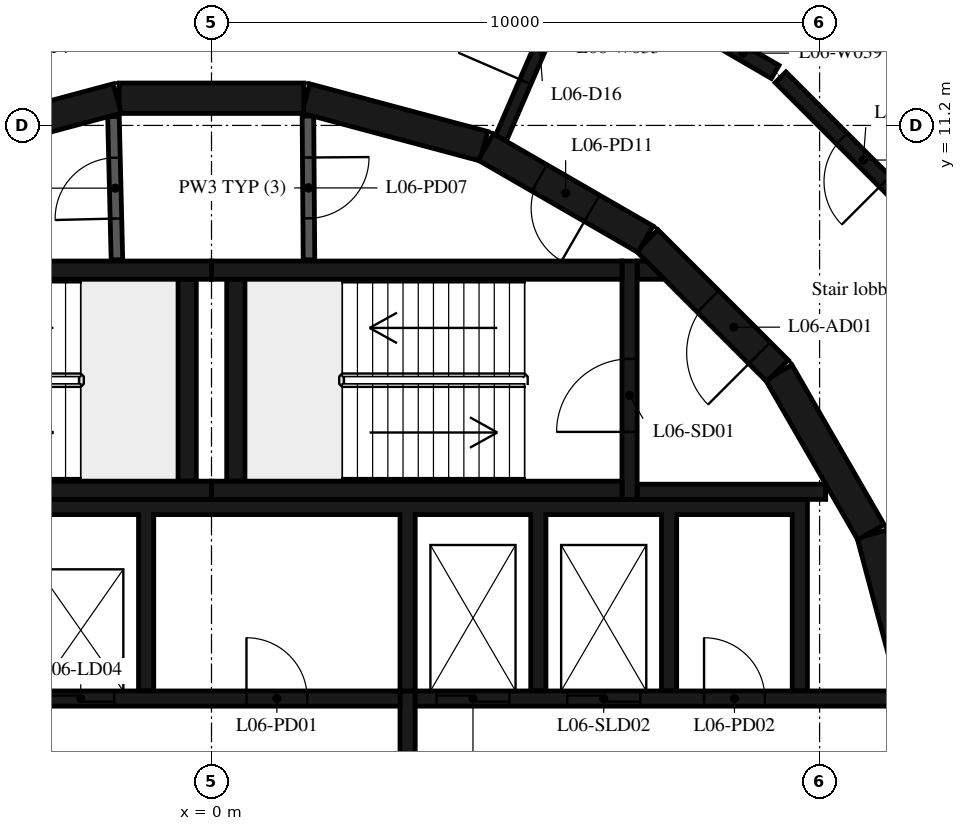
"""IFC4 building model, lengths in metres.
Left out: names, types, materials, properties, quantities, classifications, styles, units other than length and angle.
Written with IfcOpenShell. Run it as: python <this file> out.ifc"""

import sys

from ifc_helpers import new_model, si_unit, direction, frame, frame_2d, origin, place, context, subcontext, project, spatial, polyline, rectangle, outline, extrude, element, fill, save


model = new_model("IFC4")
c1 = context("Model", 3, precision=1e-05, world=origin(), true_north=direction((0.0, 1.0)))
c2 = subcontext(c1, "Body", "Model", "MODEL_VIEW")
j1 = project(units=[si_unit("LENGTHUNIT", "METRE"), si_unit("PLANEANGLEUNIT", "RADIAN")], contexts=[c1])
p1 = place(None, origin())
s1 = spatial("IfcSite", under=j1, at=p1, CompositionType="ELEMENT")
p2 = place(p1, origin())
s2 = spatial("IfcBuilding", under=s1, at=p2, CompositionType="ELEMENT")
p3 = place(p2, frame((0.0, 0.0, 33.0)))
s3 = spatial("IfcBuildingStorey", under=s2, at=p3, CompositionType="ELEMENT", Elevation=33.0)
for number, where, z_axis, x_axis in (
    (1, (11.643, 1.55, 0.0), (0.0, 0.0, 1.0), (-0.259, 0.966, 0.0)),
    (2, (10.845, 4.51, 0.0), (0.0, 0.0, 1.0), (-0.5, 0.866, 0.0)),
):
    element("IfcWall", number, at=place(p3, frame(where, z_axis=z_axis, x_axis=x_axis)), inside=s3, PredefinedType="SHEAR", context=c2, shape_type="SweptSolid", body=[
        extrude(rectangle(XDim=3.033, YDim=0.5, at=frame_2d((1.516, 0.0))), origin(), (0.0, 0.0, 1.0), 4.95),
    ])
p4 = place(p3, frame((9.308, 7.164, 0.0), z_axis=(0.0, 0.0, 1.0), x_axis=(-0.707106781187, 0.707106781187, 0.0)))
e3 = element("IfcWall", 3, at=p4, inside=s3, PredefinedType="SHEAR", context=c2, shape_type="SweptSolid", body=[
    extrude(rectangle(XDim=3.032, YDim=0.5, at=frame_2d((1.516, 0.0))), origin(), (0.0, 0.0, 1.0), 4.95),
])
p5 = place(p4, frame((0.416, 0.0, 0.0)))
e4 = element("IfcOpeningElement", 4, at=p5, cuts=e3, PredefinedType="OPENING", context=c2, shape_type="SweptSolid", body=[
    extrude(rectangle(XDim=1.2, YDim=2.1, at=frame_2d((0.6, 1.05))), frame((0.0, 0.26, 0.0), z_axis=(0.0, -1.0, 0.0), x_axis=(1.0, 0.0, 0.0)), (0.0, 0.0, 1.0), 0.52),
])
p6 = place(p3, frame((7.137, 9.329, 0.0), z_axis=(0.0, 0.0, 1.0), x_axis=(-0.865975092491, 0.500087131594, 0.0)))
e5 = element("IfcWall", 5, at=p6, inside=s3, PredefinedType="SHEAR", context=c2, shape_type="SweptSolid", body=[
    extrude(rectangle(XDim=3.033, YDim=0.5, at=frame_2d((1.516, 0.0))), origin(), (0.0, 0.0, 1.0), 4.95),
])
p7 = place(p6, frame((1.016, 0.0, 0.0)))
e6 = element("IfcOpeningElement", 6, at=p7, cuts=e5, PredefinedType="OPENING", context=c2, shape_type="SweptSolid", body=[
    extrude(rectangle(XDim=1.0, YDim=2.4, at=frame_2d((0.5, 1.2))), frame((0.0, 0.26, 0.0), z_axis=(0.0, -1.0, 0.0), x_axis=(1.0, 0.0, 0.0)), (0.0, 0.0, 1.0), 0.52),
])
for number, where, z_axis, x_axis in (
    (7, (4.479, 10.858, 0.0), (0.0, 0.0, 1.0), (-0.966, 0.259, 0.0)),
    (8, (1.516, 11.647, 0.0), (0.0, 0.0, 1.0), (-1.0, 0.0, 0.0)),
    (9, (-1.55, 11.643, 0.0), (0.0, 0.0, 1.0), (-0.966, -0.259, 0.0)),
):
    element("IfcWall", number, at=place(p3, frame(where, z_axis=z_axis, x_axis=x_axis)), inside=s3, PredefinedType="SHEAR", context=c2, shape_type="SweptSolid", body=[
        extrude(rectangle(XDim=3.033, YDim=0.5, at=frame_2d((1.516, 0.0))), origin(), (0.0, 0.0, 1.0), 4.95),
    ])
for number, where, z_axis, x_axis in (
    (10, (0.0, 5.2, 0.0), (0.0, 0.0, 1.0), (1.0, 0.0, 0.0)),
    (11, (0.0, 8.82, 0.0), (0.0, 0.0, 1.0), (1.0, 0.0, 0.0)),
):
    element("IfcWall", number, at=place(p3, frame(where, z_axis=z_axis, x_axis=x_axis)), inside=s3, PredefinedType="SHEAR", context=c2, shape_type="SweptSolid", body=[
        extrude(rectangle(XDim=6.75, YDim=0.3, at=frame_2d((3.375, 0.0))), origin(), (0.0, 0.0, 1.0), 4.95),
    ])
p8 = place(p3, frame((0.4, 5.35, 0.0), z_axis=(0.0, 0.0, 1.0), x_axis=(0.0, 1.0, 0.0)))
e12 = element("IfcWall", 12, at=p8, inside=s3, PredefinedType="SHEAR", context=c2, shape_type="SweptSolid", body=[
    extrude(rectangle(XDim=3.32, YDim=0.3, at=frame_2d((1.66, 0.0))), origin(), (0.0, 0.0, 1.0), 4.95),
])
p9 = place(p3, frame((6.875, 5.05, 0.0), z_axis=(0.0, 0.0, 1.0), x_axis=(0.0, 1.0, 0.0)))
e13 = element("IfcWall", 13, at=p9, inside=s3, PredefinedType="SHEAR", context=c2, shape_type="SweptSolid", body=[
    extrude(rectangle(XDim=3.92, YDim=0.25, at=frame_2d((1.96, 0.0))), origin(), (0.0, 0.0, 1.0), 4.95),
])
p10 = place(p9, frame((1.11, 0.0, 0.0)))
e14 = element("IfcOpeningElement", 14, at=p10, cuts=e13, PredefinedType="OPENING", context=c2, shape_type="SweptSolid", body=[
    extrude(rectangle(XDim=1.2, YDim=2.1, at=frame_2d((0.6, 1.05))), frame((0.0, 0.135, 0.0), z_axis=(0.0, -1.0, 0.0), x_axis=(1.0, 0.0, 0.0)), (0.0, 0.0, 1.0), 0.27),
])
p11 = place(p3, frame((7.0, 5.175, 0.0), z_axis=(0.0, 0.0, 1.0), x_axis=(1.0, 0.0, 0.0)))
e15 = element("IfcWall", 15, at=p11, inside=s3, PredefinedType="SHEAR", context=c2, shape_type="SweptSolid", body=[
    extrude(rectangle(XDim=3.1, YDim=0.25, at=frame_2d((1.55, 0.0))), origin(), (0.0, 0.0, 1.0), 4.95),
])
p12 = place(p3, origin())
e16 = element("IfcWall", 16, at=p12, inside=s3, PredefinedType="SHEAR", context=c2, shape_type="SweptSolid", body=[
    extrude(outline(polyline([(7.448, 8.67), (7.0, 8.67), (7.0, 8.97), (7.148, 8.97), (7.448, 8.67)])), origin(), (0.0, 0.0, 1.0), 4.95),
])
for number, where, z_axis, x_axis in (
    (17, (-6.75, 5.2, 0.0), (0.0, 0.0, 1.0), (1.0, 0.0, 0.0)),
    (18, (-6.75, 8.82, 0.0), (0.0, 0.0, 1.0), (1.0, 0.0, 0.0)),
):
    element("IfcWall", number, at=place(p3, frame(where, z_axis=z_axis, x_axis=x_axis)), inside=s3, PredefinedType="SHEAR", context=c2, shape_type="SweptSolid", body=[
        extrude(rectangle(XDim=6.75, YDim=0.3, at=frame_2d((3.375, 0.0))), origin(), (0.0, 0.0, 1.0), 4.95),
    ])
p13 = place(p3, frame((-0.4, 5.35, 0.0), z_axis=(0.0, 0.0, 1.0), x_axis=(0.0, 1.0, 0.0)))
e19 = element("IfcWall", 19, at=p13, inside=s3, PredefinedType="SHEAR", context=c2, shape_type="SweptSolid", body=[
    extrude(rectangle(XDim=3.32, YDim=0.3, at=frame_2d((1.66, 0.0))), origin(), (0.0, 0.0, 1.0), 4.95),
])
p14 = place(p3, origin())
e20 = element("IfcWall", 20, at=p14, inside=s3, PredefinedType="SHEAR", context=c2, shape_type="SweptSolid", body=[
    extrude(outline(polyline([(-9.55, 4.8), (-7.65, 4.8), (-7.65, 1.9), (-7.4, 1.9), (-7.4, 4.8), (-5.5, 4.8), (-5.5, 1.9), (-5.25, 1.9), (-5.25, 4.8), (-3.35, 4.8), (-3.35, 1.9), (-3.1, 1.9), (-3.1, 4.8), (-1.2, 4.8), (-1.2, 1.9), (-0.95, 1.9), (-0.95, 4.8), (3.1, 4.8), (3.1, 1.9), (3.35, 1.9), (3.35, 4.8), (5.25, 4.8), (5.25, 1.9), (5.5, 1.9), (5.5, 4.8), (7.4, 4.8), (7.4, 1.9), (7.65, 1.9), (7.65, 4.8), (9.55, 4.8), (9.55, 1.9), (9.8, 1.9), (9.8, 4.8), (9.8, 5.05), (-9.8, 5.05), (-9.8, 4.8), (-9.8, 1.9), (-9.55, 1.9), (-9.55, 4.8)])), origin(), (0.0, 0.0, 1.0), 4.95),
])
p15 = place(p3, frame((-11.28, 1.775, 0.0), z_axis=(0.0, 0.0, 1.0), x_axis=(1.0, 0.0, 0.0)))
e21 = element("IfcWall", 21, at=p15, inside=s3, PredefinedType="SHEAR", context=c2, shape_type="SweptSolid", body=[
    extrude(rectangle(XDim=14.38, YDim=0.25, at=frame_2d((7.19, 0.0))), origin(), (0.0, 0.0, 1.0), 4.95),
])
p16 = place(p15, frame((2.13, 0.0, 0.0)))
e22 = element("IfcOpeningElement", 22, at=p16, cuts=e21, PredefinedType="OPENING", context=c2, shape_type="SweptSolid", body=[
    extrude(rectangle(XDim=1.1, YDim=2.1, at=frame_2d((0.55, 1.05))), frame((0.0, 0.135, 0.0), z_axis=(0.0, -1.0, 0.0), x_axis=(1.0, 0.0, 0.0)), (0.0, 0.0, 1.0), 0.27),
])
p17 = place(p15, frame((4.28, 0.0, 0.0)))
e23 = element("IfcOpeningElement", 23, at=p17, cuts=e21, PredefinedType="OPENING", context=c2, shape_type="SweptSolid", body=[
    extrude(rectangle(XDim=1.1, YDim=2.1, at=frame_2d((0.55, 1.05))), frame((0.0, 0.135, 0.0), z_axis=(0.0, -1.0, 0.0), x_axis=(1.0, 0.0, 0.0)), (0.0, 0.0, 1.0), 0.27),
])
p18 = place(p15, frame((6.43, 0.0, 0.0)))
e24 = element("IfcOpeningElement", 24, at=p18, cuts=e21, PredefinedType="OPENING", context=c2, shape_type="SweptSolid", body=[
    extrude(rectangle(XDim=1.1, YDim=2.1, at=frame_2d((0.55, 1.05))), frame((0.0, 0.135, 0.0), z_axis=(0.0, -1.0, 0.0), x_axis=(1.0, 0.0, 0.0)), (0.0, 0.0, 1.0), 0.27),
])
p19 = place(p15, frame((8.58, 0.0, 0.0)))
e25 = element("IfcOpeningElement", 25, at=p19, cuts=e21, PredefinedType="OPENING", context=c2, shape_type="SweptSolid", body=[
    extrude(rectangle(XDim=1.1, YDim=2.1, at=frame_2d((0.55, 1.05))), frame((0.0, 0.135, 0.0), z_axis=(0.0, -1.0, 0.0), x_axis=(1.0, 0.0, 0.0)), (0.0, 0.0, 1.0), 0.27),
])
p20 = place(p15, frame((11.855, 0.0, 0.0)))
e26 = element("IfcOpeningElement", 26, at=p20, cuts=e21, PredefinedType="OPENING", context=c2, shape_type="SweptSolid", body=[
    extrude(rectangle(XDim=1.0, YDim=2.4, at=frame_2d((0.5, 1.2))), frame((0.0, 0.135, 0.0), z_axis=(0.0, -1.0, 0.0), x_axis=(1.0, 0.0, 0.0)), (0.0, 0.0, 1.0), 0.27),
])
p21 = place(p3, frame((3.35, 1.775, 0.0), z_axis=(0.0, 0.0, 1.0), x_axis=(1.0, 0.0, 0.0)))
e27 = element("IfcWall", 27, at=p21, inside=s3, PredefinedType="SHEAR", context=c2, shape_type="SweptSolid", body=[
    extrude(rectangle(XDim=7.93, YDim=0.25, at=frame_2d((3.965, 0.0))), origin(), (0.0, 0.0, 1.0), 4.95),
])
p22 = place(p21, frame((0.35, 0.0, 0.0)))
e28 = element("IfcOpeningElement", 28, at=p22, cuts=e27, PredefinedType="OPENING", context=c2, shape_type="SweptSolid", body=[
    extrude(rectangle(XDim=1.2, YDim=2.4, at=frame_2d((0.6, 1.2))), frame((0.0, 0.135, 0.0), z_axis=(0.0, -1.0, 0.0), x_axis=(1.0, 0.0, 0.0)), (0.0, 0.0, 1.0), 0.27),
])
p23 = place(p21, frame((2.5, 0.0, 0.0)))
e29 = element("IfcOpeningElement", 29, at=p23, cuts=e27, PredefinedType="OPENING", context=c2, shape_type="SweptSolid", body=[
    extrude(rectangle(XDim=1.2, YDim=2.4, at=frame_2d((0.6, 1.2))), frame((0.0, 0.135, 0.0), z_axis=(0.0, -1.0, 0.0), x_axis=(1.0, 0.0, 0.0)), (0.0, 0.0, 1.0), 0.27),
])
p24 = place(p21, frame((4.75, 0.0, 0.0)))
e30 = element("IfcOpeningElement", 30, at=p24, cuts=e27, PredefinedType="OPENING", context=c2, shape_type="SweptSolid", body=[
    extrude(rectangle(XDim=1.0, YDim=2.4, at=frame_2d((0.5, 1.2))), frame((0.0, 0.135, 0.0), z_axis=(0.0, -1.0, 0.0), x_axis=(1.0, 0.0, 0.0)), (0.0, 0.0, 1.0), 0.27),
])
p25 = place(p3, frame((3.225, -1.9, 0.0), z_axis=(0.0, 0.0, 1.0), x_axis=(0.0, 1.0, 0.0)))
e31 = element("IfcWall", 31, at=p25, inside=s3, PredefinedType="SHEAR", context=c2, shape_type="SweptSolid", body=[
    extrude(rectangle(XDim=3.8, YDim=0.25, at=frame_2d((1.9, 0.0))), origin(), (0.0, 0.0, 1.0), 4.95),
])
p26 = place(p3, frame((1.586, 11.354, 0.0), z_axis=(0.0, 0.0, 1.0), x_axis=(0.007227482881, -0.999973881405, 0.0)))
e32 = element("IfcWall", 32, at=p26, inside=s3, PredefinedType="PARTITIONING", context=c2, shape_type="SweptSolid", body=[
    extrude(rectangle(XDim=2.365, YDim=0.19, at=frame_2d((1.182, 0.0))), origin(), (0.0, 0.0, 1.0), 4.95),
])
p27 = place(p26, frame((0.682, 0.0, 0.0)))
e33 = element("IfcOpeningElement", 33, at=p27, cuts=e32, PredefinedType="OPENING", context=c2, shape_type="SweptSolid", body=[
    extrude(rectangle(XDim=1.0, YDim=2.4, at=frame_2d((0.5, 1.2))), frame((0.0, 0.105, 0.0), z_axis=(0.0, -1.0, 0.0), x_axis=(1.0, 0.0, 0.0)), (0.0, 0.0, 1.0), 0.21),
])
p28 = place(p3, frame((-1.555, 8.99, 0.0), z_axis=(0.0, 0.0, 1.0), x_axis=(-0.024125549686, 0.999708936567, 0.0)))
e34 = element("IfcWall", 34, at=p28, inside=s3, PredefinedType="PARTITIONING", context=c2, shape_type="SweptSolid", body=[
    extrude(rectangle(XDim=2.358, YDim=0.19, at=frame_2d((1.179, 0.0))), origin(), (0.0, 0.0, 1.0), 4.95),
])
p29 = place(p28, frame((0.679, 0.0, 0.0)))
e35 = element("IfcOpeningElement", 35, at=p29, cuts=e34, PredefinedType="OPENING", context=c2, shape_type="SweptSolid", body=[
    extrude(rectangle(XDim=1.0, YDim=2.4, at=frame_2d((0.5, 1.2))), frame((0.0, 0.105, 0.0), z_axis=(0.0, -1.0, 0.0), x_axis=(1.0, 0.0, 0.0)), (0.0, 0.0, 1.0), 0.21),
])
p30 = place(p3, frame((4.76, 10.99, 0.0), z_axis=(0.0, 0.0, 1.0), x_axis=(0.396905977672, 0.917859272922, 0.0)))
e36 = element("IfcWall", 36, at=p30, inside=s3, PredefinedType="PARTITIONING", context=c2, shape_type="SweptSolid", body=[
    extrude(rectangle(XDim=3.224, YDim=0.2, at=frame_2d((1.612, 0.0))), origin(), (0.0, 0.0, 1.0), 4.95),
])
p31 = place(p30, frame((1.012, 0.0, 0.0)))
e37 = element("IfcOpeningElement", 37, at=p31, cuts=e36, PredefinedType="OPENING", context=c2, shape_type="SweptSolid", body=[
    extrude(rectangle(XDim=1.2, YDim=2.1, at=frame_2d((0.6, 1.05))), frame((0.0, 0.11, 0.0), z_axis=(0.0, -1.0, 0.0), x_axis=(1.0, 0.0, 0.0)), (0.0, 0.0, 1.0), 0.22),
])
p32 = place(p3, frame((9.27, 12.08, 0.0), z_axis=(0.0, 0.0, 1.0), x_axis=(-0.864599561852, 0.502461538474, 0.0)))
e38 = element("IfcWall", 38, at=p32, inside=s3, PredefinedType="PARTITIONING", context=c2, shape_type="SweptSolid", body=[
    extrude(rectangle(XDim=1.228, YDim=0.25, at=frame_2d((0.614, 0.0))), origin(), (0.0, 0.0, 1.0), 4.95),
])
p33 = place(p3, frame((12.08, 9.27, 0.0), z_axis=(0.0, 0.0, 1.0), x_axis=(-0.707106781187, 0.707106781187, 0.0)))
e39 = element("IfcWall", 39, at=p33, inside=s3, PredefinedType="PARTITIONING", context=c2, shape_type="SweptSolid", body=[
    extrude(rectangle(XDim=3.849, YDim=0.25, at=frame_2d((1.925, 0.0))), origin(), (0.0, 0.0, 1.0), 4.95),
])
p34 = place(p33, frame((1.425, 0.0, 0.0)))
e40 = element("IfcOpeningElement", 40, at=p34, cuts=e39, PredefinedType="OPENING", context=c2, shape_type="SweptSolid", body=[
    extrude(rectangle(XDim=1.0, YDim=2.1, at=frame_2d((0.5, 1.05))), frame((0.0, 0.135, 0.0), z_axis=(0.0, -1.0, 0.0), x_axis=(1.0, 0.0, 0.0)), (0.0, 0.0, 1.0), 0.27),
])
p35 = place(p10, origin())
e41 = element("IfcDoor", 41, at=p35, inside=s3, OperationType="SINGLE_SWING_LEFT", PredefinedType="DOOR", context=c2, shape_type="SweptSolid", body=[
    extrude(rectangle(XDim=1.2, YDim=2.1, at=frame_2d((0.6, 1.05))), frame((0.0, 0.025, 0.0), z_axis=(0.0, -1.0, 0.0), x_axis=(1.0, 0.0, 0.0)), (0.0, 0.0, 1.0), 0.05),
])
fill(e14, e41)
p36 = place(p5, origin())
e42 = element("IfcDoor", 42, at=p36, inside=s3, OperationType="SINGLE_SWING_RIGHT", PredefinedType="DOOR", context=c2, shape_type="SweptSolid", body=[
    extrude(rectangle(XDim=1.2, YDim=2.1, at=frame_2d((0.6, 1.05))), frame((0.0, 0.025, 0.0), z_axis=(0.0, -1.0, 0.0), x_axis=(1.0, 0.0, 0.0)), (0.0, 0.0, 1.0), 0.05),
])
fill(e4, e42)
p37 = place(p19, origin())
e43 = element("IfcDoor", 43, at=p37, inside=s3, OperationType="DOUBLE_DOOR_SLIDING", PredefinedType="DOOR", context=c2, shape_type="SweptSolid", body=[
    extrude(rectangle(XDim=1.1, YDim=2.1, at=frame_2d((0.55, 1.05))), frame((0.0, 0.025, 0.0), z_axis=(0.0, -1.0, 0.0), x_axis=(1.0, 0.0, 0.0)), (0.0, 0.0, 1.0), 0.05),
])
fill(e25, e43)
p38 = place(p22, origin())
e44 = element("IfcDoor", 44, at=p38, inside=s3, OperationType="DOUBLE_DOOR_SLIDING", PredefinedType="DOOR", context=c2, shape_type="SweptSolid", body=[
    extrude(rectangle(XDim=1.2, YDim=2.4, at=frame_2d((0.6, 1.2))), frame((0.0, 0.025, 0.0), z_axis=(0.0, -1.0, 0.0), x_axis=(1.0, 0.0, 0.0)), (0.0, 0.0, 1.0), 0.05),
])
fill(e28, e44)
p39 = place(p23, origin())
e45 = element("IfcDoor", 45, at=p39, inside=s3, OperationType="DOUBLE_DOOR_SLIDING", PredefinedType="DOOR", context=c2, shape_type="SweptSolid", body=[
    extrude(rectangle(XDim=1.2, YDim=2.4, at=frame_2d((0.6, 1.2))), frame((0.0, 0.025, 0.0), z_axis=(0.0, -1.0, 0.0), x_axis=(1.0, 0.0, 0.0)), (0.0, 0.0, 1.0), 0.05),
])
fill(e29, e45)
p40 = place(p20, origin())
e46 = element("IfcDoor", 46, at=p40, inside=s3, OperationType="SINGLE_SWING_RIGHT", PredefinedType="DOOR", context=c2, shape_type="SweptSolid", body=[
    extrude(rectangle(XDim=1.0, YDim=2.4, at=frame_2d((0.5, 1.2))), frame((0.0, 0.025, 0.0), z_axis=(0.0, -1.0, 0.0), x_axis=(1.0, 0.0, 0.0)), (0.0, 0.0, 1.0), 0.05),
])
fill(e26, e46)
p41 = place(p24, origin())
e47 = element("IfcDoor", 47, at=p41, inside=s3, OperationType="SINGLE_SWING_LEFT", PredefinedType="DOOR", context=c2, shape_type="SweptSolid", body=[
    extrude(rectangle(XDim=1.0, YDim=2.4, at=frame_2d((0.5, 1.2))), frame((0.0, 0.025, 0.0), z_axis=(0.0, -1.0, 0.0), x_axis=(1.0, 0.0, 0.0)), (0.0, 0.0, 1.0), 0.05),
])
fill(e30, e47)
p42 = place(p27, origin())
e48 = element("IfcDoor", 48, at=p42, inside=s3, OperationType="SINGLE_SWING_RIGHT", PredefinedType="DOOR", context=c2, shape_type="SweptSolid", body=[
    extrude(rectangle(XDim=1.0, YDim=2.4, at=frame_2d((0.5, 1.2))), frame((0.0, 0.025, 0.0), z_axis=(0.0, -1.0, 0.0), x_axis=(1.0, 0.0, 0.0)), (0.0, 0.0, 1.0), 0.05),
])
fill(e33, e48)
p43 = place(p29, origin())
e49 = element("IfcDoor", 49, at=p43, inside=s3, OperationType="SINGLE_SWING_LEFT", PredefinedType="DOOR", context=c2, shape_type="SweptSolid", body=[
    extrude(rectangle(XDim=1.0, YDim=2.4, at=frame_2d((0.5, 1.2))), frame((0.0, 0.025, 0.0), z_axis=(0.0, -1.0, 0.0), x_axis=(1.0, 0.0, 0.0)), (0.0, 0.0, 1.0), 0.05),
])
fill(e35, e49)
p44 = place(p7, origin())
e50 = element("IfcDoor", 50, at=p44, inside=s3, OperationType="SINGLE_SWING_RIGHT", PredefinedType="DOOR", context=c2, shape_type="SweptSolid", body=[
    extrude(rectangle(XDim=1.0, YDim=2.4, at=frame_2d((0.5, 1.2))), frame((0.0, 0.025, 0.0), z_axis=(0.0, -1.0, 0.0), x_axis=(1.0, 0.0, 0.0)), (0.0, 0.0, 1.0), 0.05),
])
fill(e6, e50)
p45 = place(p34, origin())
e51 = element("IfcDoor", 51, at=p45, inside=s3, OperationType="SINGLE_SWING_LEFT", PredefinedType="DOOR", context=c2, shape_type="SweptSolid", body=[
    extrude(rectangle(XDim=1.0, YDim=2.1, at=frame_2d((0.5, 1.05))), frame((0.0, 0.025, 0.0), z_axis=(0.0, -1.0, 0.0), x_axis=(1.0, 0.0, 0.0)), (0.0, 0.0, 1.0), 0.05),
])
fill(e40, e51)
p46 = place(p31, origin())
e52 = element("IfcDoor", 52, at=p46, inside=s3, OperationType="SINGLE_SWING_LEFT", PredefinedType="DOOR", context=c2, shape_type="SweptSolid", body=[
    extrude(rectangle(XDim=1.2, YDim=2.1, at=frame_2d((0.6, 1.05))), frame((0.0, 0.025, 0.0), z_axis=(0.0, -1.0, 0.0), x_axis=(1.0, 0.0, 0.0)), (0.0, 0.0, 1.0), 0.05),
])
fill(e37, e52)
save(model, sys.argv[1])
